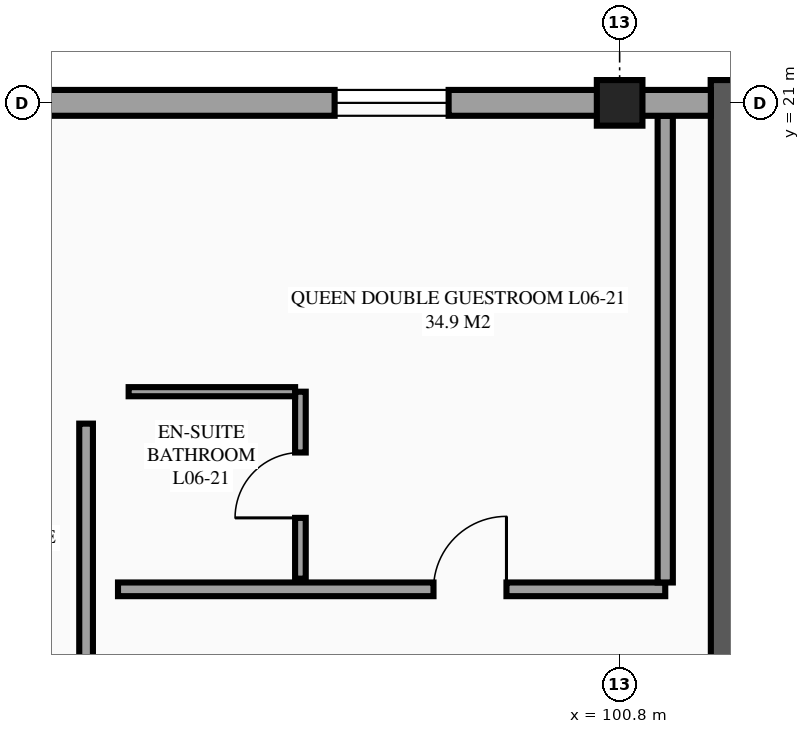
"""IFC4 building model, lengths in metres.
Left out: names, types, materials, properties, quantities, classifications, styles, units other than length and angle.
Written with IfcOpenShell. Run it as: python <this file> out.ifc"""

import sys

from ifc_helpers import new_model, si_unit, direction, frame, frame_2d, origin, origin_2d, place, context, subcontext, project, spatial, rectangle, extrude, element, fill, save


model = new_model("IFC4")
c1 = context("Model", 3, precision=1e-05, world=origin(), true_north=direction((0.0, 1.0)))
c2 = subcontext(c1, "Body", "Model", "MODEL_VIEW")
j1 = project(units=[si_unit("LENGTHUNIT", "METRE"), si_unit("PLANEANGLEUNIT", "RADIAN")], contexts=[c1])
p1 = place(None, origin())
s1 = spatial("IfcSite", under=j1, at=p1, CompositionType="ELEMENT")
p2 = place(p1, origin())
s2 = spatial("IfcBuilding", under=s1, at=p2, CompositionType="ELEMENT")
p3 = place(p2, frame((0.0, 0.0, 25.5)))
s3 = spatial("IfcBuildingStorey", under=s2, at=p3, CompositionType="ELEMENT", Elevation=25.5)
p4 = place(p3, frame((100.8, 21.0, 0.0), z_axis=(0.0, 0.0, 1.0), x_axis=(1.0, 0.0, 0.0)))
e1 = element("IfcColumn", 1, at=p4, inside=s3, PredefinedType="COLUMN", context=c2, shape_type="SweptSolid", body=[
    extrude(rectangle(XDim=0.6, YDim=0.6, at=origin_2d()), origin(), (0.0, 0.0, 1.0), 3.6),
])
p5 = place(p3, frame((107.2, 21.15, 0.0), z_axis=(0.0, 0.0, 1.0), x_axis=(-1.0, 0.0, 0.0)))
e2 = element("IfcWall", 2, at=p5, inside=s3, PredefinedType="SHEAR", context=c2, shape_type="SweptSolid", body=[
    extrude(rectangle(XDim=5.2, YDim=0.3, at=frame_2d((2.6, 0.0))), origin(), (0.0, 0.0, 1.0), 3.6),
])
p6 = place(p3, frame((102.15, 21.3, 0.0), z_axis=(0.0, 0.0, 1.0), x_axis=(0.0, -1.0, 0.0)))
e3 = element("IfcWall", 3, at=p6, inside=s3, PredefinedType="SHEAR", context=c2, shape_type="SweptSolid", body=[
    extrude(rectangle(XDim=8.84, YDim=0.3, at=frame_2d((4.42, 0.0))), origin(), (0.0, 0.0, 1.0), 3.6),
])
p7 = place(p3, frame((94.2, 14.6, 0.0), z_axis=(0.0, 0.0, 1.0), x_axis=(1.0, 0.0, 0.0)))
e4 = element("IfcWall", 4, at=p7, inside=s3, PredefinedType="PARTITIONING", context=c2, shape_type="SweptSolid", body=[
    extrude(rectangle(XDim=7.2, YDim=0.18, at=frame_2d((3.6, 0.0))), origin(), (0.0, 0.0, 1.0), 3.375),
])
p8 = place(p7, frame((4.151, 0.0, 0.0)))
e5 = element("IfcOpeningElement", 5, at=p8, cuts=e4, PredefinedType="OPENING", context=c2, shape_type="SweptSolid", body=[
    extrude(rectangle(XDim=0.96, YDim=2.15, at=frame_2d((0.48, 1.075))), frame((0.0, 0.1, 0.0), z_axis=(0.0, -1.0, 0.0), x_axis=(1.0, 0.0, 0.0)), (0.0, 0.0, 1.0), 0.2),
])
p9 = place(p3, frame((101.4, 14.69, 0.0), z_axis=(0.0, 0.0, 1.0), x_axis=(0.0, 1.0, 0.0)))
e6 = element("IfcWall", 6, at=p9, inside=s3, PredefinedType="PARTITIONING", context=c2, shape_type="SweptSolid", body=[
    extrude(rectangle(XDim=6.14, YDim=0.2, at=frame_2d((3.07, 0.0))), origin(), (0.0, 0.0, 1.0), 3.375),
])
p10 = place(p3, frame((96.6, 14.74, 0.0), z_axis=(0.0, 0.0, 1.0), x_axis=(0.0, 1.0, 0.0)))
e7 = element("IfcWall", 7, at=p10, inside=s3, PredefinedType="PARTITIONING", context=c2, shape_type="SweptSolid", body=[
    extrude(rectangle(XDim=2.46, YDim=0.14, at=frame_2d((1.23, 0.0))), origin(), (0.0, 0.0, 1.0), 3.375),
])
p11 = place(p10, frame((0.8, 0.0, 0.0)))
e8 = element("IfcOpeningElement", 8, at=p11, cuts=e7, PredefinedType="OPENING", context=c2, shape_type="SweptSolid", body=[
    extrude(rectangle(XDim=0.86, YDim=2.1, at=frame_2d((0.43, 1.05))), frame((0.0, 0.08, 0.0), z_axis=(0.0, -1.0, 0.0), x_axis=(1.0, 0.0, 0.0)), (0.0, 0.0, 1.0), 0.16),
])
p12 = place(p3, frame((94.34, 17.2, 0.0), z_axis=(0.0, 0.0, 1.0), x_axis=(1.0, 0.0, 0.0)))
e9 = element("IfcWall", 9, at=p12, inside=s3, PredefinedType="PARTITIONING", context=c2, shape_type="SweptSolid", body=[
    extrude(rectangle(XDim=2.19, YDim=0.12, at=frame_2d((1.095, 0.0))), origin(), (0.0, 0.0, 1.0), 3.375),
])
p13 = place(p3, frame((93.78, 12.91, 0.0), z_axis=(0.0, 0.0, 1.0), x_axis=(0.0, 1.0, 0.0)))
e10 = element("IfcWall", 10, at=p13, inside=s3, PredefinedType="PARTITIONING", context=c2, shape_type="SweptSolid", body=[
    extrude(rectangle(XDim=3.87, YDim=0.18, at=frame_2d((1.935, 0.0))), origin(), (0.0, 0.0, 1.0), 3.375),
])
p14 = place(p3, frame((102.0, 21.0, 0.0), z_axis=(0.0, 0.0, 1.0), x_axis=(-1.0, 0.0, 0.0)))
e11 = element("IfcWall", 11, at=p14, inside=s3, PredefinedType="STANDARD", context=c2, shape_type="SweptSolid", body=[
    extrude(rectangle(XDim=1.2, YDim=0.34, at=frame_2d((0.6, 0.0))), origin(), (0.0, 0.0, 1.0), 2.63),
])
p15 = place(p3, frame((100.8, 21.0, 0.0), z_axis=(0.0, 0.0, 1.0), x_axis=(-1.0, 0.0, 0.0)))
e12 = element("IfcWall", 12, at=p15, inside=s3, PredefinedType="STANDARD", context=c2, shape_type="SweptSolid", body=[
    extrude(rectangle(XDim=8.4, YDim=0.34, at=frame_2d((4.2, 0.0))), origin(), (0.0, 0.0, 1.0), 2.88),
])
p16 = place(p15, frame((2.25, 0.0, 0.85)))
e13 = element("IfcOpeningElement", 13, at=p16, cuts=e12, PredefinedType="OPENING", context=c2, shape_type="SweptSolid", body=[
    extrude(rectangle(XDim=1.5, YDim=1.5, at=frame_2d((0.75, 0.75))), frame((0.0, 0.18, 0.0), z_axis=(0.0, -1.0, 0.0), x_axis=(1.0, 0.0, 0.0)), (0.0, 0.0, 1.0), 0.36),
])
p17 = place(p16, origin())
e14 = element("IfcWindow", 14, at=p17, inside=s3, PartitioningType="SINGLE_PANEL", PredefinedType="WINDOW", context=c2, shape_type="SweptSolid", body=[
    extrude(rectangle(XDim=1.5, YDim=1.5, at=frame_2d((0.75, 0.75))), frame((0.0, 0.03, 0.0), z_axis=(0.0, -1.0, 0.0), x_axis=(1.0, 0.0, 0.0)), (0.0, 0.0, 1.0), 0.06),
])
fill(e13, e14)
p18 = place(p8, origin())
e15 = element("IfcDoor", 15, at=p18, inside=s3, OperationType="SINGLE_SWING_RIGHT", PredefinedType="DOOR", context=c2, shape_type="SweptSolid", body=[
    extrude(rectangle(XDim=0.96, YDim=2.15, at=frame_2d((0.48, 1.075))), frame((0.0, 0.025, 0.0), z_axis=(0.0, -1.0, 0.0), x_axis=(1.0, 0.0, 0.0)), (0.0, 0.0, 1.0), 0.05),
])
fill(e5, e15)
p19 = place(p11, origin())
e16 = element("IfcDoor", 16, at=p19, inside=s3, OperationType="SINGLE_SWING_LEFT", PredefinedType="DOOR", context=c2, shape_type="SweptSolid", body=[
    extrude(rectangle(XDim=0.86, YDim=2.1, at=frame_2d((0.43, 1.05))), frame((0.0, 0.025, 0.0), z_axis=(0.0, -1.0, 0.0), x_axis=(1.0, 0.0, 0.0)), (0.0, 0.0, 1.0), 0.05),
])
fill(e8, e16)
save(model, sys.argv[1])
